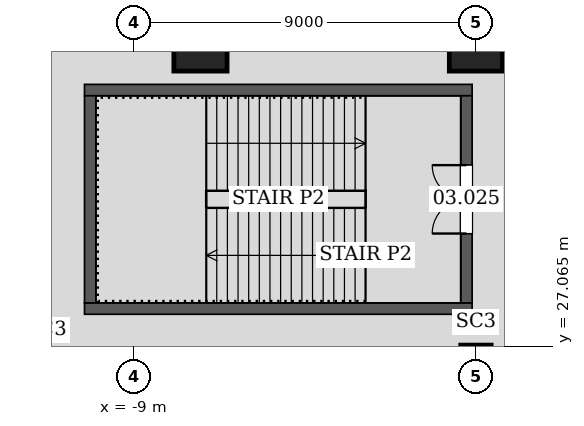
"""IFC4 building model, lengths in metres.
Left out: names, types, materials, properties, quantities, classifications, styles, units other than length and angle.
Written with IfcOpenShell. Run it as: python <this file> out.ifc"""

import sys

from ifc_helpers import new_model, si_unit, direction, frame, frame_2d, origin, origin_2d, place, context, subcontext, project, spatial, rectangle, hollow_rectangle, extrude, element, fill, save


model = new_model("IFC4")
c1 = context("Model", 3, precision=1e-05, world=origin(), true_north=direction((0.0, 1.0)))
c2 = subcontext(c1, "Body", "Model", "MODEL_VIEW")
j1 = project(units=[si_unit("LENGTHUNIT", "METRE"), si_unit("PLANEANGLEUNIT", "RADIAN")], contexts=[c1])
p1 = place(None, origin())
s1 = spatial("IfcSite", under=j1, at=p1, CompositionType="ELEMENT")
p2 = place(p1, origin())
s2 = spatial("IfcBuilding", under=s1, at=p2, CompositionType="ELEMENT")
p3 = place(p2, frame((0.0, 0.0, 18.6)))
s3 = spatial("IfcBuildingStorey", under=s2, at=p3, CompositionType="ELEMENT", Elevation=18.6)
p4 = place(p3, frame((-10.691, 25.81, 0.0), z_axis=(0.011704430453, -0.028289472832, 0.999531246152), x_axis=(0.92403481427, 0.3823083337, 0.0)))
e1 = element("IfcColumn", 1, at=p4, inside=s3, PredefinedType="COLUMN", context=c2, shape_type="SweptSolid", body=[
    extrude(hollow_rectangle(XDim=2.0, YDim=2.0, WallThickness=0.09, at=origin_2d()), origin(), (0.0, 0.0, 1.0), 5.402),
])
p5 = place(p3, frame((0.0, 26.688, 0.0), z_axis=(0.0, -0.02824625291, 0.999600994996), x_axis=(1.0, 0.0, 0.0)))
e2 = element("IfcColumn", 2, at=p5, inside=s3, PredefinedType="COLUMN", context=c2, shape_type="SweptSolid", body=[
    extrude(hollow_rectangle(XDim=0.8, YDim=0.8, WallThickness=0.05, at=origin_2d()), origin(), (0.0, 0.0, 1.0), 5.402),
])
for number, where, z_axis, x_axis in (
    (3, (0.0, 35.0, 0.0), (0.0, 0.0, 1.0), (1.0, 0.0, 0.0)),
    (4, (-7.249, 35.0, 0.0), (0.0, 0.0, 1.0), (1.0, 0.0, 0.0)),
):
    element("IfcColumn", number, at=place(p3, frame(where, z_axis=z_axis, x_axis=x_axis)), inside=s3, PredefinedType="COLUMN", context=c2, shape_type="SweptSolid", body=[
        extrude(rectangle(XDim=1.4, YDim=1.4, at=origin_2d()), origin(), (0.0, 0.0, 1.0), 5.4),
    ])
for number, where, z_axis, x_axis in (
    (5, (-10.3, 28.05, 0.0), (0.0, 0.0, 1.0), (1.0, 0.0, 0.0)),
    (6, (-0.1, 33.8, 0.0), (0.0, 0.0, 1.0), (-1.0, 0.0, 0.0)),
):
    element("IfcWall", number, at=place(p3, frame(where, z_axis=z_axis, x_axis=x_axis)), inside=s3, PredefinedType="SOLIDWALL", context=c2, shape_type="SweptSolid", body=[
        extrude(rectangle(XDim=10.2, YDim=0.3, at=frame_2d((5.1, 0.0))), origin(), (0.0, 0.0, 1.0), 5.4),
    ])
p6 = place(p3, frame((-10.15, 33.65, 0.0), z_axis=(0.0, 0.0, 1.0), x_axis=(0.0, -1.0, 0.0)))
e7 = element("IfcWall", 7, at=p6, inside=s3, PredefinedType="SOLIDWALL", context=c2, shape_type="SweptSolid", body=[
    extrude(rectangle(XDim=5.45, YDim=0.3, at=frame_2d((2.725, 0.0))), origin(), (0.0, 0.0, 1.0), 5.4),
])
p7 = place(p3, frame((-0.25, 28.2, 0.0), z_axis=(0.0, 0.0, 1.0), x_axis=(0.0, 1.0, 0.0)))
e8 = element("IfcWall", 8, at=p7, inside=s3, PredefinedType="SOLIDWALL", context=c2, shape_type="SweptSolid", body=[
    extrude(rectangle(XDim=5.45, YDim=0.3, at=frame_2d((2.725, 0.0))), origin(), (0.0, 0.0, 1.0), 5.4),
])
p8 = place(p7, frame((1.825, 0.0, 0.0)))
e9 = element("IfcOpeningElement", 9, at=p8, cuts=e8, PredefinedType="OPENING", context=c2, shape_type="SweptSolid", body=[
    extrude(rectangle(XDim=1.8, YDim=2.1, at=frame_2d((0.9, 1.05))), frame((0.0, 0.16, 0.0), z_axis=(0.0, -1.0, 0.0), x_axis=(1.0, 0.0, 0.0)), (0.0, 0.0, 1.0), 0.32),
])
p9 = place(p8, origin())
e10 = element("IfcDoor", 10, at=p9, inside=s3, OperationType="DOUBLE_DOOR_SINGLE_SWING", PredefinedType="DOOR", context=c2, shape_type="SweptSolid", body=[
    extrude(rectangle(XDim=1.8, YDim=2.1, at=frame_2d((0.9, 1.05))), frame((0.0, 0.025, 0.0), z_axis=(0.0, -1.0, 0.0), x_axis=(1.0, 0.0, 0.0)), (0.0, 0.0, 1.0), 0.05),
])
fill(e9, e10)
save(model, sys.argv[1])
